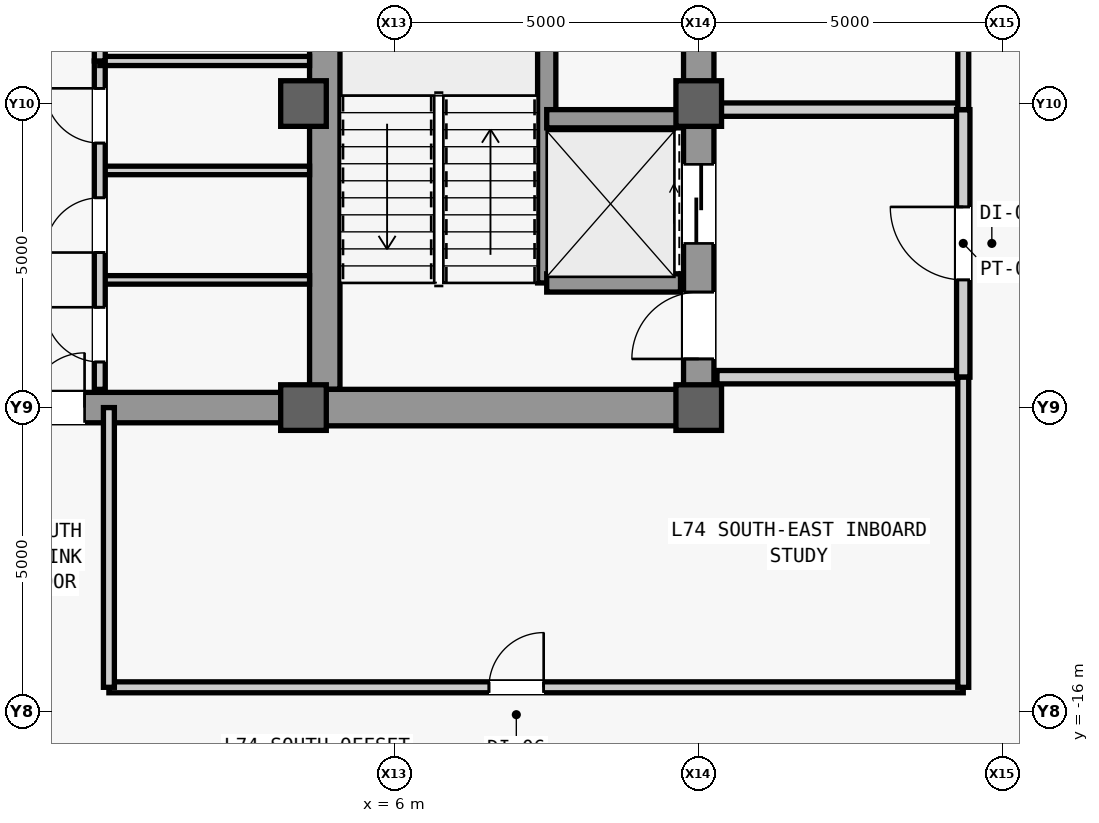
"""IFC4 building model, lengths in metres.
Left out: names, types, materials, properties, quantities, classifications, styles, units other than length and angle.
Written with IfcOpenShell. Run it as: python <this file> out.ifc"""

import sys

from ifc_helpers import new_model, si_unit, direction, frame, frame_2d, origin, origin_2d, place, context, subcontext, project, spatial, rectangle, extrude, source, transform, mapped, element, fill, save


model = new_model("IFC4")
c1 = context("Model", 3, precision=1e-05, world=origin(), true_north=direction((0.0, 1.0)))
c2 = subcontext(c1, "Body", "Model", "MODEL_VIEW")
j1 = project(units=[si_unit("LENGTHUNIT", "METRE"), si_unit("PLANEANGLEUNIT", "RADIAN")], contexts=[c1])
p1 = place(None, origin())
s1 = spatial("IfcSite", under=j1, at=p1, CompositionType="ELEMENT")
p2 = place(p1, origin())
s2 = spatial("IfcBuilding", under=s1, at=p2, CompositionType="ELEMENT")
p3 = place(p2, frame((0.0, 0.0, 313.5)))
s3 = spatial("IfcBuildingStorey", under=s2, at=p3, CompositionType="ELEMENT", Elevation=313.5)
m1 = source(origin(), c2, "Body", "SweptSolid", [
    extrude(rectangle(XDim=22.0, YDim=0.5, at=frame_2d((11.0, 0.0))), origin(), (0.0, 0.0, 1.0), 3.78),
])
p4 = place(p3, frame((11.0, -11.0, 0.0), z_axis=(0.0, 0.0, 1.0), x_axis=(0.0, 1.0, 0.0)))
e1 = element("IfcWall", 1, at=p4, inside=s3, PredefinedType="SHEAR", context=c2, shape_type="MappedRepresentation", body=[
    mapped(m1, transform((0.0, 0.0, 0.0), scale=1.0)),
])
m2 = source(origin(), c2, "Body", "SweptSolid", [
    extrude(rectangle(XDim=1.1, YDim=2.2, at=frame_2d((0.55, 1.1))), frame((0.0, 0.26, 0.0), z_axis=(0.0, -1.0, 0.0), x_axis=(1.0, 0.0, 0.0)), (0.0, 0.0, 1.0), 0.52),
])
p5 = place(p4, frame((0.8, 0.0, 0.0)))
e2 = element("IfcOpeningElement", 2, at=p5, cuts=e1, PredefinedType="OPENING", context=c2, shape_type="MappedRepresentation", body=[
    mapped(m2, transform((0.0, 0.0, 0.0), scale=1.0)),
])
m3 = source(origin(), c2, "Body", "SweptSolid", [
    extrude(rectangle(XDim=0.9, YDim=2.15, at=frame_2d((0.45, 1.075))), frame((0.0, 0.26, 0.0), z_axis=(0.0, -1.0, 0.0), x_axis=(1.0, 0.0, 0.0)), (0.0, 0.0, 1.0), 0.52),
])
p6 = place(p4, frame((6.85, 0.0, 0.0)))
e3 = element("IfcOpeningElement", 3, at=p6, cuts=e1, PredefinedType="OPENING", context=c2, shape_type="MappedRepresentation", body=[
    mapped(m3, transform((0.0, 0.0, 0.0), scale=1.0)),
])
m4 = source(origin(), c2, "Body", "SweptSolid", [
    extrude(rectangle(XDim=1.2, YDim=2.3, at=frame_2d((0.6, 1.15))), frame((0.0, 0.26, 0.0), z_axis=(0.0, -1.0, 0.0), x_axis=(1.0, 0.0, 0.0)), (0.0, 0.0, 1.0), 0.52),
])
p7 = place(p4, frame((17.6, 0.0, 0.0)))
e4 = element("IfcOpeningElement", 4, at=p7, cuts=e1, PredefinedType="OPENING", context=c2, shape_type="MappedRepresentation", body=[
    mapped(m4, transform((0.0, 0.0, 0.0), scale=1.0)),
])
p8 = place(p4, frame((19.6, 0.0, 0.0)))
e5 = element("IfcOpeningElement", 5, at=p8, cuts=e1, PredefinedType="OPENING", context=c2, shape_type="MappedRepresentation", body=[
    mapped(m4, transform((0.0, 0.0, 0.0), scale=1.0)),
])
m5 = source(origin(), c2, "Body", "SweptSolid", [
    extrude(rectangle(XDim=1.3, YDim=2.3, at=frame_2d((0.65, 1.15))), frame((0.0, 0.26, 0.0), z_axis=(0.0, -1.0, 0.0), x_axis=(1.0, 0.0, 0.0)), (0.0, 0.0, 1.0), 0.52),
])
p9 = place(p4, frame((2.7, 0.0, 0.0)))
e6 = element("IfcOpeningElement", 6, at=p9, cuts=e1, PredefinedType="OPENING", context=c2, shape_type="MappedRepresentation", body=[
    mapped(m5, transform((0.0, 0.0, 0.0), scale=1.0)),
])
p10 = place(p4, frame((13.35, 0.0, 0.0)))
e7 = element("IfcOpeningElement", 7, at=p10, cuts=e1, PredefinedType="OPENING", context=c2, shape_type="MappedRepresentation", body=[
    mapped(m5, transform((0.0, 0.0, 0.0), scale=1.0)),
])
m6 = source(origin(), c2, "Body", "SweptSolid", [
    extrude(rectangle(XDim=21.4, YDim=0.5, at=frame_2d((10.7, 0.0))), origin(), (0.0, 0.0, 1.0), 3.78),
])
p11 = place(p3, frame((4.85, -10.7, 0.0), z_axis=(0.0, 0.0, 1.0), x_axis=(0.0, 1.0, 0.0)))
e8 = element("IfcWall", 8, at=p11, inside=s3, PredefinedType="SHEAR", context=c2, shape_type="MappedRepresentation", body=[
    mapped(m6, transform((0.0, 0.0, 0.0), scale=1.0)),
])
m7 = source(origin(), c2, "Body", "SweptSolid", [
    extrude(rectangle(XDim=5.9, YDim=0.6, at=frame_2d((2.95, 0.0))), origin(), (0.0, 0.0, 1.0), 3.78),
])
p12 = place(p3, frame((4.85, -11.0, 0.0), z_axis=(0.0, 0.0, 1.0), x_axis=(1.0, 0.0, 0.0)))
e9 = element("IfcWall", 9, at=p12, inside=s3, PredefinedType="SHEAR", context=c2, shape_type="MappedRepresentation", body=[
    mapped(m7, transform((0.0, 0.0, 0.0), scale=1.0)),
])
m8 = source(origin(), c2, "Body", "SweptSolid", [
    extrude(rectangle(XDim=9.2, YDim=0.5, at=frame_2d((4.6, 0.0))), origin(), (0.0, 0.0, 1.0), 3.78),
])
p13 = place(p3, frame((-4.6, -11.0, 0.0), z_axis=(0.0, 0.0, 1.0), x_axis=(1.0, 0.0, 0.0)))
e10 = element("IfcWall", 10, at=p13, inside=s3, PredefinedType="SHEAR", context=c2, shape_type="MappedRepresentation", body=[
    mapped(m8, transform((0.0, 0.0, 0.0), scale=1.0)),
])
m9 = source(origin(), c2, "Body", "SweptSolid", [
    extrude(rectangle(XDim=1.8, YDim=2.25, at=frame_2d((0.9, 1.125))), frame((0.0, 0.26, 0.0), z_axis=(0.0, -1.0, 0.0), x_axis=(1.0, 0.0, 0.0)), (0.0, 0.0, 1.0), 0.52),
])
p14 = place(p13, frame((3.7, 0.0, 0.0)))
e11 = element("IfcOpeningElement", 11, at=p14, cuts=e10, PredefinedType="OPENING", context=c2, shape_type="MappedRepresentation", body=[
    mapped(m9, transform((0.0, 0.0, 0.0), scale=1.0)),
])
m10 = source(origin(), c2, "Body", "SweptSolid", [
    extrude(rectangle(XDim=0.75, YDim=0.75, at=origin_2d()), origin(), (0.0, 0.0, 1.0), 4.0),
])
for number, where, z_axis, x_axis in (
    (12, (4.5, -11.0, 0.0), (0.0, 0.0, 1.0), (1.0, 0.0, 0.0)),
    (13, (4.5, -6.0, 0.0), (0.0, 0.0, 1.0), (1.0, 0.0, 0.0)),
    (14, (11.0, -11.0, 0.0), (0.0, 0.0, 1.0), (1.0, 0.0, 0.0)),
    (15, (11.0, -6.0, 0.0), (0.0, 0.0, 1.0), (1.0, 0.0, 0.0)),
):
    element("IfcColumn", number, at=place(p3, frame(where, z_axis=z_axis, x_axis=x_axis)), inside=s3, PredefinedType="COLUMN", context=c2, shape_type="MappedRepresentation", body=[
        mapped(m10, transform((0.0, 0.0, 0.0), scale=1.0)),
    ])
m11 = source(origin(), c2, "Body", "SweptSolid", [
    extrude(rectangle(XDim=7.8, YDim=0.3, at=frame_2d((3.9, 0.0))), origin(), (0.0, 0.0, 1.0), 3.78),
])
p15 = place(p3, frame((8.5, -8.95, 0.0), z_axis=(0.0, 0.0, 1.0), x_axis=(0.0, 1.0, 0.0)))
e16 = element("IfcWall", 16, at=p15, inside=s3, PredefinedType="SHEAR", context=c2, shape_type="MappedRepresentation", body=[
    mapped(m11, transform((0.0, 0.0, 0.0), scale=1.0)),
])
m12 = source(origin(), c2, "Body", "SweptSolid", [
    extrude(rectangle(XDim=2.2, YDim=0.3, at=frame_2d((1.1, 0.0))), origin(), (0.0, 0.0, 1.0), 3.78),
])
for number, where, z_axis, x_axis in (
    (17, (8.5, -8.95, 0.0), (0.0, 0.0, 1.0), (1.0, 0.0, 0.0)),
    (18, (8.5, -6.25, 0.0), (0.0, 0.0, 1.0), (1.0, 0.0, 0.0)),
):
    element("IfcWall", number, at=place(p3, frame(where, z_axis=z_axis, x_axis=x_axis)), inside=s3, PredefinedType="SHEAR", context=c2, shape_type="MappedRepresentation", body=[
        mapped(m12, transform((0.0, 0.0, 0.0), scale=1.0)),
    ])
m13 = source(origin(), c2, "Body", "SweptSolid", [
    extrude(rectangle(XDim=4.05, YDim=0.22, at=frame_2d((2.025, 0.0))), origin(), (0.0, 0.0, 1.0), 3.78),
])
p16 = place(p3, frame((11.3, -10.5, 0.0), z_axis=(0.0, 0.0, 1.0), x_axis=(1.0, 0.0, 0.0)))
e19 = element("IfcWall", 19, at=p16, inside=s3, PredefinedType="PARTITIONING", context=c2, shape_type="MappedRepresentation", body=[
    mapped(m13, transform((0.0, 0.0, 0.0), scale=1.0)),
])
m14 = source(origin(), c2, "Body", "SweptSolid", [
    extrude(rectangle(XDim=4.05, YDim=0.22, at=frame_2d((2.025, 0.0))), origin(), (0.0, 0.0, 1.0), 3.085),
])
p17 = place(p3, frame((11.3, -6.1, 0.0), z_axis=(0.0, 0.0, 1.0), x_axis=(1.0, 0.0, 0.0)))
e20 = element("IfcWall", 20, at=p17, inside=s3, PredefinedType="PARTITIONING", context=c2, shape_type="MappedRepresentation", body=[
    mapped(m14, transform((0.0, 0.0, 0.0), scale=1.0)),
])
m15 = source(origin(), c2, "Body", "SweptSolid", [
    extrude(rectangle(XDim=4.4, YDim=0.22, at=frame_2d((2.2, 0.0))), origin(), (0.0, 0.0, 1.0), 3.78),
])
p18 = place(p3, frame((15.35, -10.5, 0.0), z_axis=(0.0, 0.0, 1.0), x_axis=(0.0, 1.0, 0.0)))
e21 = element("IfcWall", 21, at=p18, inside=s3, PredefinedType="PARTITIONING", context=c2, shape_type="MappedRepresentation", body=[
    mapped(m15, transform((0.0, 0.0, 0.0), scale=1.0)),
])
m16 = source(origin(), c2, "Body", "SweptSolid", [
    extrude(rectangle(XDim=1.2, YDim=2.2, at=frame_2d((0.6, 1.1))), frame((0.0, 0.12, 0.0), z_axis=(0.0, -1.0, 0.0), x_axis=(1.0, 0.0, 0.0)), (0.0, 0.0, 1.0), 0.24),
])
p19 = place(p18, frame((1.6, 0.0, 0.0)))
e22 = element("IfcOpeningElement", 22, at=p19, cuts=e21, PredefinedType="OPENING", context=c2, shape_type="MappedRepresentation", body=[
    mapped(m16, transform((0.0, 0.0, 0.0), scale=1.0)),
])
m17 = source(origin(), c2, "Body", "SweptSolid", [
    extrude(rectangle(XDim=16.6, YDim=0.18, at=frame_2d((8.3, 0.0))), origin(), (0.0, 0.0, 1.0), 3.78),
])
p20 = place(p3, frame((15.35, -6.1, 0.0), z_axis=(0.0, 0.0, 1.0), x_axis=(0.0, 1.0, 0.0)))
e23 = element("IfcWall", 23, at=p20, inside=s3, PredefinedType="PARTITIONING", context=c2, shape_type="MappedRepresentation", body=[
    mapped(m17, transform((0.0, 0.0, 0.0), scale=1.0)),
])
m18 = source(origin(), c2, "Body", "SweptSolid", [
    extrude(rectangle(XDim=1.8, YDim=2.25, at=frame_2d((0.9, 1.125))), frame((0.0, 0.1, 0.0), z_axis=(0.0, -1.0, 0.0), x_axis=(1.0, 0.0, 0.0)), (0.0, 0.0, 1.0), 0.2),
])
p21 = place(p20, frame((2.7, 0.0, 0.0)))
e24 = element("IfcOpeningElement", 24, at=p21, cuts=e23, PredefinedType="OPENING", context=c2, shape_type="MappedRepresentation", body=[
    mapped(m18, transform((0.0, 0.0, 0.0), scale=1.0)),
])
p22 = place(p20, frame((13.0, 0.0, 0.0)))
e25 = element("IfcOpeningElement", 25, at=p22, cuts=e23, PredefinedType="OPENING", context=c2, shape_type="MappedRepresentation", body=[
    mapped(m18, transform((0.0, 0.0, 0.0), scale=1.0)),
])
m19 = source(origin(), c2, "Body", "SweptSolid", [
    extrude(rectangle(XDim=3.45, YDim=0.14, at=frame_2d((1.725, 0.0))), origin(), (0.0, 0.0, 1.0), 3.78),
])
for number, where, z_axis, x_axis in (
    (26, (1.15, -8.9, 0.0), (0.0, 0.0, 1.0), (1.0, 0.0, 0.0)),
    (27, (1.15, -7.1, 0.0), (0.0, 0.0, 1.0), (1.0, 0.0, 0.0)),
):
    element("IfcWall", number, at=place(p3, frame(where, z_axis=z_axis, x_axis=x_axis)), inside=s3, PredefinedType="PARTITIONING", context=c2, shape_type="MappedRepresentation", body=[
        mapped(m19, transform((0.0, 0.0, 0.0), scale=1.0)),
    ])
m20 = source(origin(), c2, "Body", "SweptSolid", [
    extrude(rectangle(XDim=5.4, YDim=0.18, at=frame_2d((2.7, 0.0))), origin(), (0.0, 0.0, 1.0), 3.78),
])
p23 = place(p3, frame((1.15, -10.7, 0.0), z_axis=(0.0, 0.0, 1.0), x_axis=(0.0, 1.0, 0.0)))
e28 = element("IfcWall", 28, at=p23, inside=s3, PredefinedType="PARTITIONING", context=c2, shape_type="MappedRepresentation", body=[
    mapped(m20, transform((0.0, 0.0, 0.0), scale=1.0)),
])
m21 = source(origin(), c2, "Body", "SweptSolid", [
    extrude(rectangle(XDim=0.9, YDim=2.15, at=frame_2d((0.45, 1.075))), frame((0.0, 0.1, 0.0), z_axis=(0.0, -1.0, 0.0), x_axis=(1.0, 0.0, 0.0)), (0.0, 0.0, 1.0), 0.2),
])
p24 = place(p23, frame((0.45, 0.0, 0.0)))
e29 = element("IfcOpeningElement", 29, at=p24, cuts=e28, PredefinedType="OPENING", context=c2, shape_type="MappedRepresentation", body=[
    mapped(m21, transform((0.0, 0.0, 0.0), scale=1.0)),
])
p25 = place(p23, frame((2.25, 0.0, 0.0)))
e30 = element("IfcOpeningElement", 30, at=p25, cuts=e28, PredefinedType="OPENING", context=c2, shape_type="MappedRepresentation", body=[
    mapped(m21, transform((0.0, 0.0, 0.0), scale=1.0)),
])
p26 = place(p23, frame((4.05, 0.0, 0.0)))
e31 = element("IfcOpeningElement", 31, at=p26, cuts=e28, PredefinedType="OPENING", context=c2, shape_type="MappedRepresentation", body=[
    mapped(m21, transform((0.0, 0.0, 0.0), scale=1.0)),
])
m22 = source(origin(), c2, "Body", "SweptSolid", [
    extrude(rectangle(XDim=3.45, YDim=0.15, at=frame_2d((1.725, 0.0))), origin(), (0.0, 0.0, 1.0), 3.78),
])
p27 = place(p3, frame((1.15, -5.3, 0.0), z_axis=(0.0, 0.0, 1.0), x_axis=(1.0, 0.0, 0.0)))
e32 = element("IfcWall", 32, at=p27, inside=s3, PredefinedType="PARTITIONING", context=c2, shape_type="MappedRepresentation", body=[
    mapped(m22, transform((0.0, 0.0, 0.0), scale=1.0)),
])
m23 = source(origin(), c2, "Body", "SweptSolid", [
    extrude(rectangle(XDim=10.6, YDim=0.18, at=frame_2d((5.3, 0.0))), origin(), (0.0, 0.0, 1.0), 3.78),
])
p28 = place(p3, frame((1.15, -5.3, 0.0), z_axis=(0.0, 0.0, 1.0), x_axis=(0.0, 1.0, 0.0)))
e33 = element("IfcWall", 33, at=p28, inside=s3, PredefinedType="PARTITIONING", context=c2, shape_type="MappedRepresentation", body=[
    mapped(m23, transform((0.0, 0.0, 0.0), scale=1.0)),
])
p29 = place(p28, frame((1.15, 0.0, 0.0)))
e34 = element("IfcOpeningElement", 34, at=p29, cuts=e33, PredefinedType="OPENING", context=c2, shape_type="MappedRepresentation", body=[
    mapped(m21, transform((0.0, 0.0, 0.0), scale=1.0)),
])
p30 = place(p28, frame((4.6, 0.0, 0.0)))
e35 = element("IfcOpeningElement", 35, at=p30, cuts=e33, PredefinedType="OPENING", context=c2, shape_type="MappedRepresentation", body=[
    mapped(m21, transform((0.0, 0.0, 0.0), scale=1.0)),
])
p31 = place(p28, frame((7.65, 0.0, 0.0)))
e36 = element("IfcOpeningElement", 36, at=p31, cuts=e33, PredefinedType="OPENING", context=c2, shape_type="MappedRepresentation", body=[
    mapped(m21, transform((0.0, 0.0, 0.0), scale=1.0)),
])
p32 = place(p28, frame((9.475, 0.0, 0.0)))
e37 = element("IfcOpeningElement", 37, at=p32, cuts=e33, PredefinedType="OPENING", context=c2, shape_type="MappedRepresentation", body=[
    mapped(m21, transform((0.0, 0.0, 0.0), scale=1.0)),
])
m24 = source(origin(), c2, "Body", "SweptSolid", [
    extrude(rectangle(XDim=14.05, YDim=0.18, at=frame_2d((7.025, 0.0))), origin(), (0.0, 0.0, 1.0), 3.78),
])
p33 = place(p3, frame((1.3, -15.6, 0.0), z_axis=(0.0, 0.0, 1.0), x_axis=(1.0, 0.0, 0.0)))
e38 = element("IfcWall", 38, at=p33, inside=s3, PredefinedType="PARTITIONING", context=c2, shape_type="MappedRepresentation", body=[
    mapped(m24, transform((0.0, 0.0, 0.0), scale=1.0)),
])
p34 = place(p33, frame((6.25, 0.0, 0.0)))
e39 = element("IfcOpeningElement", 39, at=p34, cuts=e38, PredefinedType="OPENING", context=c2, shape_type="MappedRepresentation", body=[
    mapped(m21, transform((0.0, 0.0, 0.0), scale=1.0)),
])
m25 = source(origin(), c2, "Body", "SweptSolid", [
    extrude(rectangle(XDim=4.6, YDim=0.18, at=frame_2d((2.3, 0.0))), origin(), (0.0, 0.0, 1.0), 3.78),
])
p35 = place(p3, frame((1.3, -15.6, 0.0), z_axis=(0.0, 0.0, 1.0), x_axis=(0.0, 1.0, 0.0)))
e40 = element("IfcWall", 40, at=p35, inside=s3, PredefinedType="PARTITIONING", context=c2, shape_type="MappedRepresentation", body=[
    mapped(m25, transform((0.0, 0.0, 0.0), scale=1.0)),
])
m26 = source(origin(), c2, "Body", "SweptSolid", [
    extrude(rectangle(XDim=5.1, YDim=0.18, at=frame_2d((2.55, 0.0))), origin(), (0.0, 0.0, 1.0), 3.78),
])
p36 = place(p3, frame((15.35, -15.6, 0.0), z_axis=(0.0, 0.0, 1.0), x_axis=(0.0, 1.0, 0.0)))
e41 = element("IfcWall", 41, at=p36, inside=s3, PredefinedType="PARTITIONING", context=c2, shape_type="MappedRepresentation", body=[
    mapped(m26, transform((0.0, 0.0, 0.0), scale=1.0)),
])
m27 = source(origin(), c2, "Body", "SweptSolid", [
    extrude(rectangle(XDim=1.1, YDim=2.2, at=frame_2d((0.55, 1.1))), frame((0.0, 0.025, 0.0), z_axis=(0.0, -1.0, 0.0), x_axis=(1.0, 0.0, 0.0)), (0.0, 0.0, 1.0), 0.05),
])
p37 = place(p5, origin())
e42 = element("IfcDoor", 42, at=p37, inside=s3, OperationType="SINGLE_SWING_LEFT", PredefinedType="DOOR", context=c2, shape_type="MappedRepresentation", body=[
    mapped(m27, transform((0.0, 0.0, 0.0), scale=1.0)),
])
fill(e2, e42)
m28 = source(origin(), c2, "Body", "SweptSolid", [
    extrude(rectangle(XDim=1.2, YDim=2.2, at=frame_2d((0.6, 1.1))), frame((0.0, 0.025, 0.0), z_axis=(0.0, -1.0, 0.0), x_axis=(1.0, 0.0, 0.0)), (0.0, 0.0, 1.0), 0.05),
])
p38 = place(p19, origin())
e43 = element("IfcDoor", 43, at=p38, inside=s3, OperationType="SINGLE_SWING_RIGHT", PredefinedType="DOOR", context=c2, shape_type="MappedRepresentation", body=[
    mapped(m28, transform((0.0, 0.0, 0.0), scale=1.0)),
])
fill(e22, e43)
m29 = source(origin(), c2, "Body", "SweptSolid", [
    extrude(rectangle(XDim=0.9, YDim=2.15, at=frame_2d((0.45, 1.075))), frame((0.0, 0.025, 0.0), z_axis=(0.0, -1.0, 0.0), x_axis=(1.0, 0.0, 0.0)), (0.0, 0.0, 1.0), 0.05),
])
p39 = place(p24, origin())
e44 = element("IfcDoor", 44, at=p39, inside=s3, OperationType="SINGLE_SWING_RIGHT", PredefinedType="DOOR", context=c2, shape_type="MappedRepresentation", body=[
    mapped(m29, transform((0.0, 0.0, 0.0), scale=1.0)),
])
fill(e29, e44)
p40 = place(p25, origin())
e45 = element("IfcDoor", 45, at=p40, inside=s3, OperationType="SINGLE_SWING_LEFT", PredefinedType="DOOR", context=c2, shape_type="MappedRepresentation", body=[
    mapped(m29, transform((0.0, 0.0, 0.0), scale=1.0)),
])
fill(e30, e45)
p41 = place(p26, origin())
e46 = element("IfcDoor", 46, at=p41, inside=s3, OperationType="SINGLE_SWING_RIGHT", PredefinedType="DOOR", context=c2, shape_type="MappedRepresentation", body=[
    mapped(m29, transform((0.0, 0.0, 0.0), scale=1.0)),
])
fill(e31, e46)
m30 = source(origin(), c2, "Body", "SweptSolid", [
    extrude(rectangle(XDim=1.8, YDim=2.25, at=frame_2d((0.9, 1.125))), frame((0.0, 0.025, 0.0), z_axis=(0.0, -1.0, 0.0), x_axis=(1.0, 0.0, 0.0)), (0.0, 0.0, 1.0), 0.05),
])
p42 = place(p14, origin())
e47 = element("IfcDoor", 47, at=p42, inside=s3, OperationType="SINGLE_SWING_LEFT", PredefinedType="DOOR", context=c2, shape_type="MappedRepresentation", body=[
    mapped(m30, transform((0.0, 0.0, 0.0), scale=1.0)),
])
fill(e11, e47)
p43 = place(p34, origin())
e48 = element("IfcDoor", 48, at=p43, inside=s3, OperationType="SINGLE_SWING_RIGHT", PredefinedType="DOOR", context=c2, shape_type="MappedRepresentation", body=[
    mapped(m29, transform((0.0, 0.0, 0.0), scale=1.0)),
])
fill(e39, e48)
m31 = source(origin(), c2, "Body", "SweptSolid", [
    extrude(rectangle(XDim=1.3, YDim=2.3, at=frame_2d((0.65, 1.15))), frame((0.0, 0.025, 0.0), z_axis=(0.0, -1.0, 0.0), x_axis=(1.0, 0.0, 0.0)), (0.0, 0.0, 1.0), 0.05),
])
p44 = place(p9, origin())
e49 = element("IfcDoor", 49, at=p44, inside=s3, OperationType="SLIDING_TO_LEFT", PredefinedType="DOOR", context=c2, shape_type="MappedRepresentation", body=[
    mapped(m31, transform((0.0, 0.0, 0.0), scale=1.0)),
])
fill(e6, e49)
save(model, sys.argv[1])
